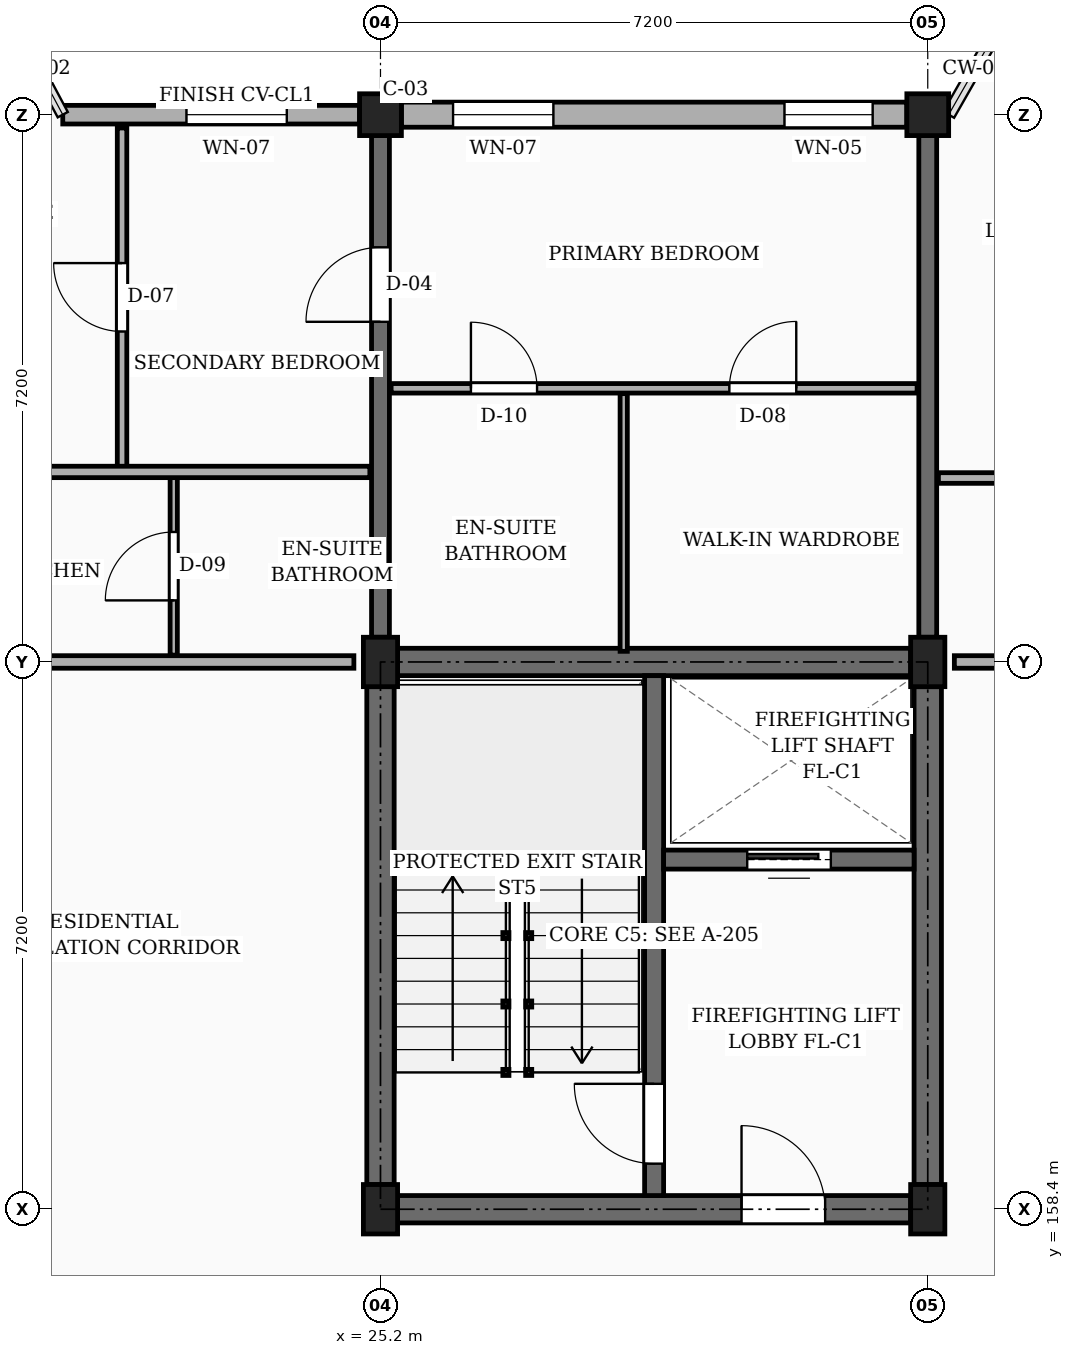
"""IFC4 building model, lengths in metres.
Left out: names, types, materials, properties, quantities, classifications, styles, units other than length and angle.
Written with IfcOpenShell. Run it as: python <this file> out.ifc"""

import sys

from ifc_helpers import new_model, si_unit, direction, frame, frame_2d, origin, origin_2d, place, context, subcontext, project, spatial, rectangle, extrude, element, fill, save


model = new_model("IFC4")
c1 = context("Model", 3, precision=1e-05, world=origin(), true_north=direction((0.0, 1.0)))
c2 = subcontext(c1, "Body", "Model", "MODEL_VIEW")
j1 = project(units=[si_unit("LENGTHUNIT", "METRE"), si_unit("PLANEANGLEUNIT", "RADIAN")], contexts=[c1])
p1 = place(None, origin())
s1 = spatial("IfcSite", under=j1, at=p1, CompositionType="ELEMENT")
p2 = place(p1, origin())
s2 = spatial("IfcBuilding", under=s1, at=p2, CompositionType="ELEMENT")
p3 = place(p2, frame((0.0, 0.0, 17.1)))
s3 = spatial("IfcBuildingStorey", under=s2, at=p3, CompositionType="ELEMENT", Elevation=17.1)
for number, where, z_axis, x_axis in (
    (1, (25.2, 158.4, 0.0), (0.0, 0.0, 1.0), (1.0, 0.0, 0.0)),
    (2, (25.2, 165.6, 0.0), (0.0, 0.0, 1.0), (1.0, 0.0, 0.0)),
):
    element("IfcColumn", number, at=place(p3, frame(where, z_axis=z_axis, x_axis=x_axis)), inside=s3, PredefinedType="COLUMN", context=c2, shape_type="SweptSolid", body=[
        extrude(rectangle(XDim=0.45, YDim=0.65, at=origin_2d()), origin(), (0.0, 0.0, 1.0), 3.15),
    ])
p4 = place(p3, frame((25.2, 172.8, 0.0), z_axis=(0.0, 0.0, 1.0), x_axis=(1.0, 0.0, 0.0)))
e3 = element("IfcColumn", 3, at=p4, inside=s3, PredefinedType="COLUMN", context=c2, shape_type="SweptSolid", body=[
    extrude(rectangle(XDim=0.55, YDim=0.55, at=origin_2d()), origin(), (0.0, 0.0, 1.0), 3.15),
])
for number, where, z_axis, x_axis in (
    (4, (32.4, 158.4, 0.0), (0.0, 0.0, 1.0), (1.0, 0.0, 0.0)),
    (5, (32.4, 165.6, 0.0), (0.0, 0.0, 1.0), (1.0, 0.0, 0.0)),
):
    element("IfcColumn", number, at=place(p3, frame(where, z_axis=z_axis, x_axis=x_axis)), inside=s3, PredefinedType="COLUMN", context=c2, shape_type="SweptSolid", body=[
        extrude(rectangle(XDim=0.45, YDim=0.65, at=origin_2d()), origin(), (0.0, 0.0, 1.0), 3.15),
    ])
p5 = place(p3, frame((32.4, 172.8, 0.0), z_axis=(0.0, 0.0, 1.0), x_axis=(1.0, 0.0, 0.0)))
e6 = element("IfcColumn", 6, at=p5, inside=s3, PredefinedType="COLUMN", context=c2, shape_type="SweptSolid", body=[
    extrude(rectangle(XDim=0.55, YDim=0.55, at=origin_2d()), origin(), (0.0, 0.0, 1.0), 3.15),
])
p6 = place(p3, frame((25.2, 165.925, 0.0), z_axis=(0.0, 0.0, 1.0), x_axis=(0.0, 1.0, 0.0)))
e7 = element("IfcWall", 7, at=p6, inside=s3, PredefinedType="SOLIDWALL", context=c2, shape_type="SweptSolid", body=[
    extrude(rectangle(XDim=6.6, YDim=0.235, at=frame_2d((3.3, 0.0))), origin(), (0.0, 0.0, 1.0), 2.185),
])
p7 = place(p6, frame((4.15, 0.0, 0.0)))
e8 = element("IfcOpeningElement", 8, at=p7, cuts=e7, PredefinedType="OPENING", context=c2, shape_type="SweptSolid", body=[
    extrude(rectangle(XDim=0.98, YDim=2.12, at=frame_2d((0.49, 1.06))), frame((0.0, 0.127, 0.0), z_axis=(0.0, -1.0, 0.0), x_axis=(1.0, 0.0, 0.0)), (0.0, 0.0, 1.0), 0.255),
])
p8 = place(p3, frame((32.4, 165.925, 0.0), z_axis=(0.0, 0.0, 1.0), x_axis=(0.0, 1.0, 0.0)))
e9 = element("IfcWall", 9, at=p8, inside=s3, PredefinedType="SOLIDWALL", context=c2, shape_type="SweptSolid", body=[
    extrude(rectangle(XDim=6.6, YDim=0.235, at=frame_2d((3.3, 0.0))), origin(), (0.0, 0.0, 1.0), 2.185),
])
p9 = place(p3, frame((32.125, 172.8, 0.0), z_axis=(0.0, 0.0, 1.0), x_axis=(-1.0, 0.0, 0.0)))
e10 = element("IfcWall", 10, at=p9, inside=s3, PredefinedType="SOLIDWALL", context=c2, shape_type="SweptSolid", body=[
    extrude(rectangle(XDim=6.65, YDim=0.33, at=frame_2d((3.325, 0.0))), origin(), (0.0, 0.0, 1.0), 2.455),
])
p10 = place(p9, frame((0.45, 0.0, 0.78)))
e11 = element("IfcOpeningElement", 11, at=p10, cuts=e10, PredefinedType="OPENING", context=c2, shape_type="SweptSolid", body=[
    extrude(rectangle(XDim=1.16, YDim=1.15, at=frame_2d((0.58, 0.575))), frame((0.0, 0.175, 0.0), z_axis=(0.0, -1.0, 0.0), x_axis=(1.0, 0.0, 0.0)), (0.0, 0.0, 1.0), 0.35),
])
p11 = place(p9, frame((4.65, 0.0, 0.78)))
e12 = element("IfcOpeningElement", 12, at=p11, cuts=e10, PredefinedType="OPENING", context=c2, shape_type="SweptSolid", body=[
    extrude(rectangle(XDim=1.32, YDim=1.15, at=frame_2d((0.66, 0.575))), frame((0.0, 0.175, 0.0), z_axis=(0.0, -1.0, 0.0), x_axis=(1.0, 0.0, 0.0)), (0.0, 0.0, 1.0), 0.35),
])
p12 = place(p3, frame((24.925, 172.8, 0.0), z_axis=(0.0, 0.0, 1.0), x_axis=(-1.0, 0.0, 0.0)))
e13 = element("IfcWall", 13, at=p12, inside=s3, PredefinedType="SOLIDWALL", context=c2, shape_type="SweptSolid", body=[
    extrude(rectangle(XDim=3.905, YDim=0.245, at=frame_2d((1.953, 0.0))), origin(), (0.0, 0.0, 1.0), 2.455),
])
p13 = place(p12, frame((0.958, 0.0, 0.78)))
e14 = element("IfcOpeningElement", 14, at=p13, cuts=e13, PredefinedType="OPENING", context=c2, shape_type="SweptSolid", body=[
    extrude(rectangle(XDim=1.32, YDim=1.15, at=frame_2d((0.66, 0.575))), frame((0.0, 0.133, 0.0), z_axis=(0.0, -1.0, 0.0), x_axis=(1.0, 0.0, 0.0)), (0.0, 0.0, 1.0), 0.265),
])
p14 = place(p3, frame((25.2, 158.725, 0.0), z_axis=(0.0, 0.0, 1.0), x_axis=(0.0, 1.0, 0.0)))
e15 = element("IfcWall", 15, at=p14, inside=s3, PredefinedType="SHEAR", context=c2, shape_type="SweptSolid", body=[
    extrude(rectangle(XDim=6.55, YDim=0.36, at=frame_2d((3.275, 0.0))), origin(), (0.0, 0.0, 1.0), 2.885),
])
p15 = place(p3, frame((25.425, 165.6, 0.0), z_axis=(0.0, 0.0, 1.0), x_axis=(1.0, 0.0, 0.0)))
e16 = element("IfcWall", 16, at=p15, inside=s3, PredefinedType="SHEAR", context=c2, shape_type="SweptSolid", body=[
    extrude(rectangle(XDim=6.75, YDim=0.36, at=frame_2d((3.375, 0.0))), origin(), (0.0, 0.0, 1.0), 2.885),
])
p16 = place(p3, frame((32.4, 158.725, 0.0), z_axis=(0.0, 0.0, 1.0), x_axis=(0.0, 1.0, 0.0)))
e17 = element("IfcWall", 17, at=p16, inside=s3, PredefinedType="SHEAR", context=c2, shape_type="SweptSolid", body=[
    extrude(rectangle(XDim=6.55, YDim=0.36, at=frame_2d((3.275, 0.0))), origin(), (0.0, 0.0, 1.0), 2.885),
])
p17 = place(p3, frame((25.425, 158.4, 0.0), z_axis=(0.0, 0.0, 1.0), x_axis=(1.0, 0.0, 0.0)))
e18 = element("IfcWall", 18, at=p17, inside=s3, PredefinedType="SHEAR", context=c2, shape_type="SweptSolid", body=[
    extrude(rectangle(XDim=6.75, YDim=0.36, at=frame_2d((3.375, 0.0))), origin(), (0.0, 0.0, 1.0), 2.885),
])
p18 = place(p17, frame((4.525, 0.0, 0.0)))
e19 = element("IfcOpeningElement", 19, at=p18, cuts=e18, PredefinedType="OPENING", context=c2, shape_type="SweptSolid", body=[
    extrude(rectangle(XDim=1.1, YDim=2.15, at=frame_2d((0.55, 1.075))), frame((0.0, 0.19, 0.0), z_axis=(0.0, -1.0, 0.0), x_axis=(1.0, 0.0, 0.0)), (0.0, 0.0, 1.0), 0.38),
])
p19 = place(p3, frame((28.8, 158.58, 0.0), z_axis=(0.0, 0.0, 1.0), x_axis=(0.0, 1.0, 0.0)))
e20 = element("IfcWall", 20, at=p19, inside=s3, PredefinedType="SHEAR", context=c2, shape_type="SweptSolid", body=[
    extrude(rectangle(XDim=6.84, YDim=0.25, at=frame_2d((3.42, 0.0))), origin(), (0.0, 0.0, 1.0), 2.885),
])
p20 = place(p19, frame((0.42, 0.0, 0.0)))
e21 = element("IfcOpeningElement", 21, at=p20, cuts=e20, PredefinedType="OPENING", context=c2, shape_type="SweptSolid", body=[
    extrude(rectangle(XDim=1.05, YDim=2.15, at=frame_2d((0.525, 1.075))), frame((0.0, 0.135, 0.0), z_axis=(0.0, -1.0, 0.0), x_axis=(1.0, 0.0, 0.0)), (0.0, 0.0, 1.0), 0.27),
])
p21 = place(p3, frame((28.925, 163.0, 0.0), z_axis=(0.0, 0.0, 1.0), x_axis=(1.0, 0.0, 0.0)))
e22 = element("IfcWall", 22, at=p21, inside=s3, PredefinedType="SHEAR", context=c2, shape_type="SweptSolid", body=[
    extrude(rectangle(XDim=3.295, YDim=0.25, at=frame_2d((1.647, 0.0))), origin(), (0.0, 0.0, 1.0), 2.885),
])
p22 = place(p21, frame((1.1, 0.0, 0.0)))
e23 = element("IfcOpeningElement", 23, at=p22, cuts=e22, PredefinedType="OPENING", context=c2, shape_type="SweptSolid", body=[
    extrude(rectangle(XDim=1.1, YDim=2.2, at=frame_2d((0.55, 1.1))), frame((0.0, 0.135, 0.0), z_axis=(0.0, -1.0, 0.0), x_axis=(1.0, 0.0, 0.0)), (0.0, 0.0, 1.0), 0.27),
])
p23 = place(p3, frame((18.35, 165.6, 0.0), z_axis=(0.0, 0.0, 1.0), x_axis=(1.0, 0.0, 0.0)))
e24 = element("IfcWall", 24, at=p23, inside=s3, PredefinedType="PARTITIONING", context=c2, shape_type="SweptSolid", body=[
    extrude(rectangle(XDim=6.5, YDim=0.165, at=frame_2d((3.25, 0.0))), origin(), (0.0, 0.0, 1.0), 2.235),
])
p24 = place(p23, frame((1.0, 0.0, 0.0)))
e25 = element("IfcOpeningElement", 25, at=p24, cuts=e24, PredefinedType="OPENING", context=c2, shape_type="SweptSolid", body=[
    extrude(rectangle(XDim=0.94, YDim=2.12, at=frame_2d((0.47, 1.06))), frame((0.0, 0.093, 0.0), z_axis=(0.0, -1.0, 0.0), x_axis=(1.0, 0.0, 0.0)), (0.0, 0.0, 1.0), 0.185),
])
p25 = place(p3, frame((32.75, 165.6, 0.0), z_axis=(0.0, 0.0, 1.0), x_axis=(1.0, 0.0, 0.0)))
e26 = element("IfcWall", 26, at=p25, inside=s3, PredefinedType="PARTITIONING", context=c2, shape_type="SweptSolid", body=[
    extrude(rectangle(XDim=6.5, YDim=0.165, at=frame_2d((3.25, 0.0))), origin(), (0.0, 0.0, 1.0), 2.235),
])
p26 = place(p25, frame((1.0, 0.0, 0.0)))
e27 = element("IfcOpeningElement", 27, at=p26, cuts=e26, PredefinedType="OPENING", context=c2, shape_type="SweptSolid", body=[
    extrude(rectangle(XDim=1.14, YDim=2.18, at=frame_2d((0.57, 1.09))), frame((0.0, 0.093, 0.0), z_axis=(0.0, -1.0, 0.0), x_axis=(1.0, 0.0, 0.0)), (0.0, 0.0, 1.0), 0.185),
])
p27 = place(p3, frame((21.8, 168.17, 0.0), z_axis=(0.0, 0.0, 1.0), x_axis=(0.0, 1.0, 0.0)))
e28 = element("IfcWall", 28, at=p27, inside=s3, PredefinedType="PARTITIONING", context=c2, shape_type="SweptSolid", body=[
    extrude(rectangle(XDim=4.455, YDim=0.125, at=frame_2d((2.228, 0.0))), origin(), (0.0, 0.0, 1.0), 2.32),
])
p28 = place(p27, frame((1.778, 0.0, 0.0)))
e29 = element("IfcOpeningElement", 29, at=p28, cuts=e28, PredefinedType="OPENING", context=c2, shape_type="SweptSolid", body=[
    extrude(rectangle(XDim=0.9, YDim=2.1, at=frame_2d((0.45, 1.05))), frame((0.0, 0.073, 0.0), z_axis=(0.0, -1.0, 0.0), x_axis=(1.0, 0.0, 0.0)), (0.0, 0.0, 1.0), 0.145),
])
p29 = place(p3, frame((22.48, 165.69, 0.0), z_axis=(0.0, 0.0, 1.0), x_axis=(0.0, 1.0, 0.0)))
e30 = element("IfcWall", 30, at=p29, inside=s3, PredefinedType="PARTITIONING", context=c2, shape_type="SweptSolid", body=[
    extrude(rectangle(XDim=2.34, YDim=0.095, at=frame_2d((1.17, 0.0))), origin(), (0.0, 0.0, 1.0), 2.32),
])
p30 = place(p29, frame((0.72, 0.0, 0.0)))
e31 = element("IfcOpeningElement", 31, at=p30, cuts=e30, PredefinedType="OPENING", context=c2, shape_type="SweptSolid", body=[
    extrude(rectangle(XDim=0.9, YDim=2.05, at=frame_2d((0.45, 1.025))), frame((0.0, 0.058, 0.0), z_axis=(0.0, -1.0, 0.0), x_axis=(1.0, 0.0, 0.0)), (0.0, 0.0, 1.0), 0.115),
])
p31 = place(p3, frame((18.14, 168.1, 0.0), z_axis=(0.0, 0.0, 1.0), x_axis=(1.0, 0.0, 0.0)))
e32 = element("IfcWall", 32, at=p31, inside=s3, PredefinedType="PARTITIONING", context=c2, shape_type="SweptSolid", body=[
    extrude(rectangle(XDim=6.92, YDim=0.15, at=frame_2d((3.46, 0.0))), origin(), (0.0, 0.0, 1.0), 2.32),
])
p32 = place(p31, frame((1.31, 0.0, 0.0)))
e33 = element("IfcOpeningElement", 33, at=p32, cuts=e32, PredefinedType="OPENING", context=c2, shape_type="SweptSolid", body=[
    extrude(rectangle(XDim=0.95, YDim=2.1, at=frame_2d((0.475, 1.05))), frame((0.0, 0.085, 0.0), z_axis=(0.0, -1.0, 0.0), x_axis=(1.0, 0.0, 0.0)), (0.0, 0.0, 1.0), 0.17),
])
p33 = place(p3, frame((25.34, 169.2, 0.0), z_axis=(0.0, 0.0, 1.0), x_axis=(1.0, 0.0, 0.0)))
e34 = element("IfcWall", 34, at=p33, inside=s3, PredefinedType="PARTITIONING", context=c2, shape_type="SweptSolid", body=[
    extrude(rectangle(XDim=6.92, YDim=0.125, at=frame_2d((3.46, 0.0))), origin(), (0.0, 0.0, 1.0), 2.32),
])
p34 = place(p33, frame((1.05, 0.0, 0.0)))
e35 = element("IfcOpeningElement", 35, at=p34, cuts=e34, PredefinedType="OPENING", context=c2, shape_type="SweptSolid", body=[
    extrude(rectangle(XDim=0.87, YDim=2.05, at=frame_2d((0.435, 1.025))), frame((0.0, 0.073, 0.0), z_axis=(0.0, -1.0, 0.0), x_axis=(1.0, 0.0, 0.0)), (0.0, 0.0, 1.0), 0.145),
])
p35 = place(p33, frame((4.45, 0.0, 0.0)))
e36 = element("IfcOpeningElement", 36, at=p35, cuts=e34, PredefinedType="OPENING", context=c2, shape_type="SweptSolid", body=[
    extrude(rectangle(XDim=0.88, YDim=2.08, at=frame_2d((0.44, 1.04))), frame((0.0, 0.073, 0.0), z_axis=(0.0, -1.0, 0.0), x_axis=(1.0, 0.0, 0.0)), (0.0, 0.0, 1.0), 0.145),
])
p36 = place(p3, frame((28.4, 165.74, 0.0), z_axis=(0.0, 0.0, 1.0), x_axis=(0.0, 1.0, 0.0)))
e37 = element("IfcWall", 37, at=p36, inside=s3, PredefinedType="PARTITIONING", context=c2, shape_type="SweptSolid", body=[
    extrude(rectangle(XDim=3.39, YDim=0.095, at=frame_2d((1.695, 0.0))), origin(), (0.0, 0.0, 1.0), 2.32),
])
p37 = place(p3, frame((32.54, 168.02, 0.0), z_axis=(0.0, 0.0, 1.0), x_axis=(1.0, 0.0, 0.0)))
e38 = element("IfcWall", 38, at=p37, inside=s3, PredefinedType="PARTITIONING", context=c2, shape_type="SweptSolid", body=[
    extrude(rectangle(XDim=6.92, YDim=0.14, at=frame_2d((3.46, 0.0))), origin(), (0.0, 0.0, 1.0), 2.32),
])
p38 = place(p37, frame((1.31, 0.0, 0.0)))
e39 = element("IfcOpeningElement", 39, at=p38, cuts=e38, PredefinedType="OPENING", context=c2, shape_type="SweptSolid", body=[
    extrude(rectangle(XDim=0.92, YDim=2.1, at=frame_2d((0.46, 1.05))), frame((0.0, 0.08, 0.0), z_axis=(0.0, -1.0, 0.0), x_axis=(1.0, 0.0, 0.0)), (0.0, 0.0, 1.0), 0.16),
])
p39 = place(p10, origin())
e40 = element("IfcWindow", 40, at=p39, inside=s3, PartitioningType="SINGLE_PANEL", PredefinedType="WINDOW", context=c2, shape_type="SweptSolid", body=[
    extrude(rectangle(XDim=1.16, YDim=1.15, at=frame_2d((0.58, 0.575))), frame((0.0, 0.03, 0.0), z_axis=(0.0, -1.0, 0.0), x_axis=(1.0, 0.0, 0.0)), (0.0, 0.0, 1.0), 0.06),
])
fill(e11, e40)
p40 = place(p11, origin())
e41 = element("IfcWindow", 41, at=p40, inside=s3, PartitioningType="SINGLE_PANEL", PredefinedType="WINDOW", context=c2, shape_type="SweptSolid", body=[
    extrude(rectangle(XDim=1.32, YDim=1.15, at=frame_2d((0.66, 0.575))), frame((0.0, 0.03, 0.0), z_axis=(0.0, -1.0, 0.0), x_axis=(1.0, 0.0, 0.0)), (0.0, 0.0, 1.0), 0.06),
])
fill(e12, e41)
p41 = place(p13, origin())
e42 = element("IfcWindow", 42, at=p41, inside=s3, PartitioningType="SINGLE_PANEL", PredefinedType="WINDOW", context=c2, shape_type="SweptSolid", body=[
    extrude(rectangle(XDim=1.32, YDim=1.15, at=frame_2d((0.66, 0.575))), frame((0.0, 0.03, 0.0), z_axis=(0.0, -1.0, 0.0), x_axis=(1.0, 0.0, 0.0)), (0.0, 0.0, 1.0), 0.06),
])
fill(e14, e42)
p42 = place(p18, frame((1.1, 0.0, 0.0), z_axis=(0.0, 0.0, 1.0), x_axis=(-1.0, 0.0, 0.0)))
e43 = element("IfcDoor", 43, at=p42, inside=s3, OperationType="SINGLE_SWING_LEFT", PredefinedType="DOOR", context=c2, shape_type="SweptSolid", body=[
    extrude(rectangle(XDim=1.1, YDim=2.15, at=frame_2d((0.55, 1.075))), frame((0.0, 0.025, 0.0), z_axis=(0.0, -1.0, 0.0), x_axis=(1.0, 0.0, 0.0)), (0.0, 0.0, 1.0), 0.05),
])
fill(e19, e43)
p43 = place(p20, origin())
e44 = element("IfcDoor", 44, at=p43, inside=s3, OperationType="SINGLE_SWING_RIGHT", PredefinedType="DOOR", context=c2, shape_type="SweptSolid", body=[
    extrude(rectangle(XDim=1.05, YDim=2.15, at=frame_2d((0.525, 1.075))), frame((0.0, 0.025, 0.0), z_axis=(0.0, -1.0, 0.0), x_axis=(1.0, 0.0, 0.0)), (0.0, 0.0, 1.0), 0.05),
])
fill(e21, e44)
p44 = place(p22, origin())
e45 = element("IfcDoor", 45, at=p44, inside=s3, OperationType="SLIDING_TO_LEFT", PredefinedType="DOOR", context=c2, shape_type="SweptSolid", body=[
    extrude(rectangle(XDim=1.1, YDim=2.2, at=frame_2d((0.55, 1.1))), frame((0.0, 0.025, 0.0), z_axis=(0.0, -1.0, 0.0), x_axis=(1.0, 0.0, 0.0)), (0.0, 0.0, 1.0), 0.05),
])
fill(e23, e45)
p45 = place(p28, origin())
e46 = element("IfcDoor", 46, at=p45, inside=s3, OperationType="SINGLE_SWING_RIGHT", PredefinedType="DOOR", context=c2, shape_type="SweptSolid", body=[
    extrude(rectangle(XDim=0.9, YDim=2.1, at=frame_2d((0.45, 1.05))), frame((0.0, 0.025, 0.0), z_axis=(0.0, -1.0, 0.0), x_axis=(1.0, 0.0, 0.0)), (0.0, 0.0, 1.0), 0.05),
])
fill(e29, e46)
p46 = place(p30, origin())
e47 = element("IfcDoor", 47, at=p46, inside=s3, OperationType="SINGLE_SWING_LEFT", PredefinedType="DOOR", context=c2, shape_type="SweptSolid", body=[
    extrude(rectangle(XDim=0.9, YDim=2.05, at=frame_2d((0.45, 1.025))), frame((0.0, 0.025, 0.0), z_axis=(0.0, -1.0, 0.0), x_axis=(1.0, 0.0, 0.0)), (0.0, 0.0, 1.0), 0.05),
])
fill(e31, e47)
p47 = place(p34, origin())
e48 = element("IfcDoor", 48, at=p47, inside=s3, OperationType="SINGLE_SWING_LEFT", PredefinedType="DOOR", context=c2, shape_type="SweptSolid", body=[
    extrude(rectangle(XDim=0.87, YDim=2.05, at=frame_2d((0.435, 1.025))), frame((0.0, 0.025, 0.0), z_axis=(0.0, -1.0, 0.0), x_axis=(1.0, 0.0, 0.0)), (0.0, 0.0, 1.0), 0.05),
])
fill(e35, e48)
p48 = place(p35, origin())
e49 = element("IfcDoor", 49, at=p48, inside=s3, OperationType="SINGLE_SWING_RIGHT", PredefinedType="DOOR", context=c2, shape_type="SweptSolid", body=[
    extrude(rectangle(XDim=0.88, YDim=2.08, at=frame_2d((0.44, 1.04))), frame((0.0, 0.025, 0.0), z_axis=(0.0, -1.0, 0.0), x_axis=(1.0, 0.0, 0.0)), (0.0, 0.0, 1.0), 0.05),
])
fill(e36, e49)
p49 = place(p7, origin())
e50 = element("IfcDoor", 50, at=p49, inside=s3, OperationType="SINGLE_SWING_LEFT", PredefinedType="DOOR", context=c2, shape_type="SweptSolid", body=[
    extrude(rectangle(XDim=0.98, YDim=2.12, at=frame_2d((0.49, 1.06))), frame((0.0, 0.025, 0.0), z_axis=(0.0, -1.0, 0.0), x_axis=(1.0, 0.0, 0.0)), (0.0, 0.0, 1.0), 0.05),
])
fill(e8, e50)
save(model, sys.argv[1])
